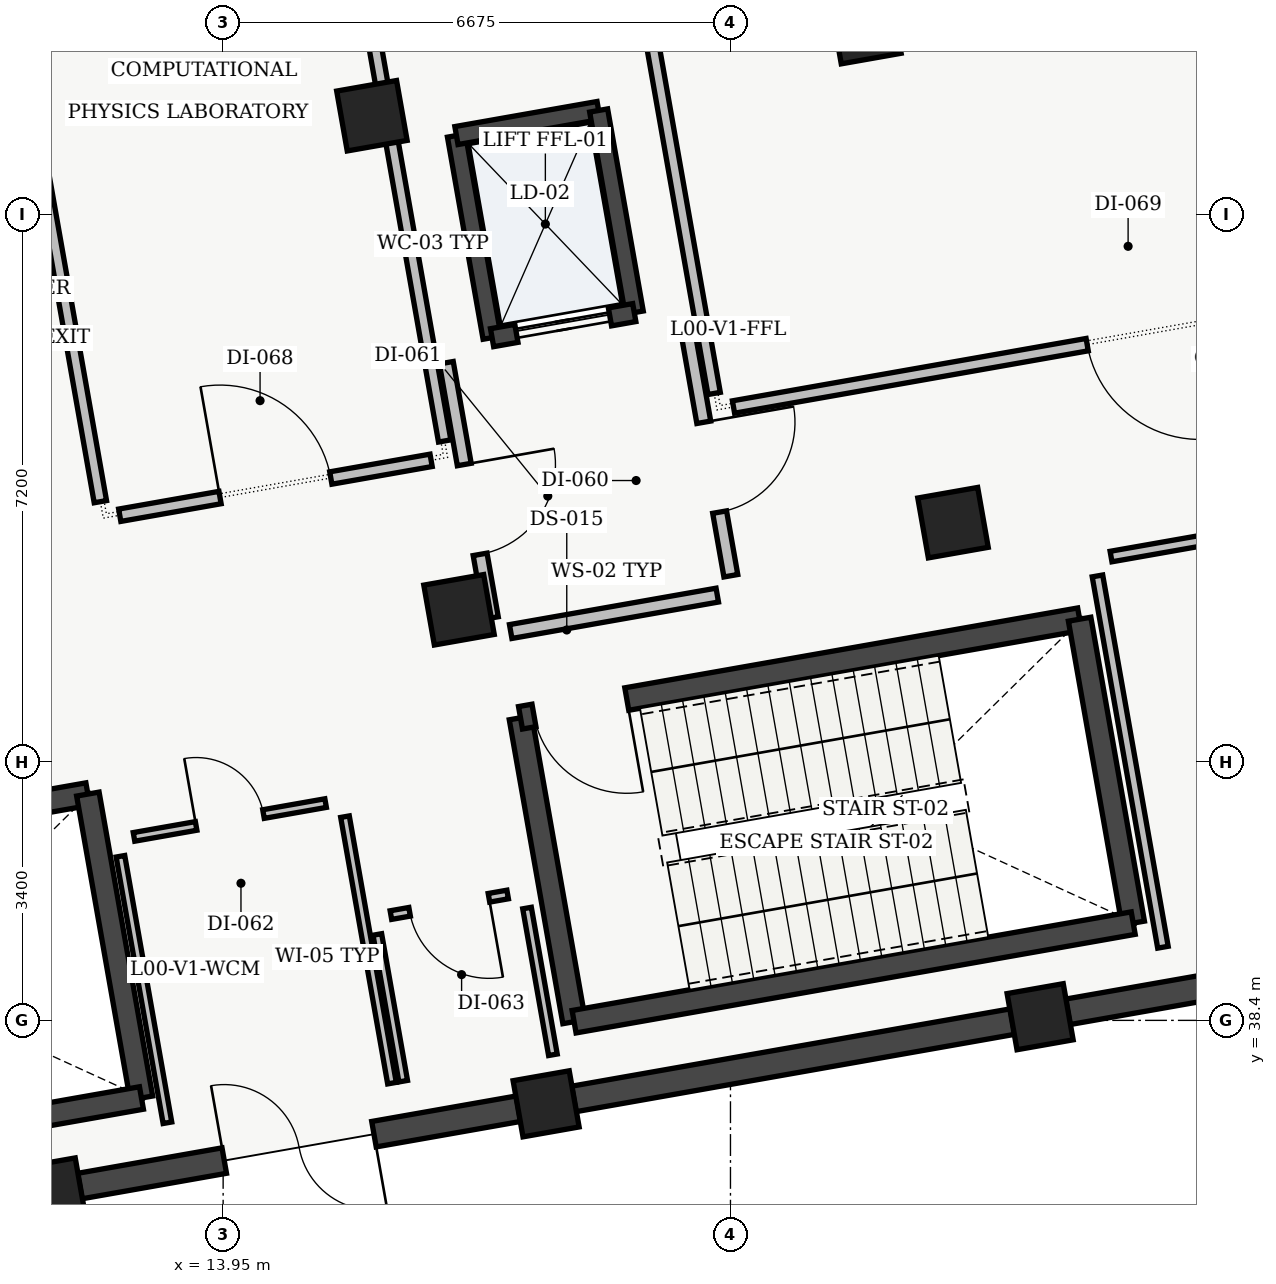
"""IFC4 building model, lengths in metres.
Left out: names, types, materials, properties, quantities, classifications, styles, units other than length and angle.
Written with IfcOpenShell. Run it as: python <this file> out.ifc"""

import sys

from ifc_helpers import new_model, si_unit, direction, frame, frame_2d, origin, origin_2d, place, context, subcontext, project, spatial, rectangle, extrude, element, fill, save


model = new_model("IFC4")
c1 = context("Model", 3, precision=1e-05, world=origin(), true_north=direction((0.0, 1.0)))
c2 = subcontext(c1, "Body", "Model", "MODEL_VIEW")
j1 = project(units=[si_unit("LENGTHUNIT", "METRE"), si_unit("PLANEANGLEUNIT", "RADIAN")], contexts=[c1])
p1 = place(None, origin())
s1 = spatial("IfcSite", under=j1, at=p1, CompositionType="ELEMENT")
p2 = place(p1, origin())
s2 = spatial("IfcBuilding", under=s1, at=p2, CompositionType="ELEMENT")
p3 = place(p2, origin())
s3 = spatial("IfcBuildingStorey", under=s2, at=p3, CompositionType="ELEMENT", Elevation=0.0)
for number, where, z_axis, x_axis in (
    (1, (11.7, 36.156, 0.0), (0.0, 0.0, 1.0), (0.985, 0.174, 0.0)),
    (2, (18.199, 37.302, 0.0), (0.0, 0.0, 1.0), (0.985, 0.174, 0.0)),
):
    element("IfcColumn", number, at=place(p3, frame(where, z_axis=z_axis, x_axis=x_axis)), inside=s3, PredefinedType="COLUMN", context=c2, shape_type="SweptSolid", body=[
        extrude(rectangle(XDim=0.75, YDim=0.75, at=origin_2d()), origin(), (0.0, 0.0, 1.0), 4.92),
    ])
for number, where, z_axis, x_axis in (
    (3, (17.053, 43.802, 0.0), (0.0, 0.0, 1.0), (0.985, 0.174, 0.0)),
    (4, (15.907, 50.302, 0.0), (0.0, 0.0, 1.0), (0.985, 0.174, 0.0)),
):
    element("IfcColumn", number, at=place(p3, frame(where, z_axis=z_axis, x_axis=x_axis)), inside=s3, PredefinedType="COLUMN", context=c2, shape_type="SweptSolid", body=[
        extrude(rectangle(XDim=0.8, YDim=0.8, at=origin_2d()), origin(), (0.0, 0.0, 1.0), 4.92),
    ])
p4 = place(p3, frame((24.699, 38.448, 0.0), z_axis=(0.0, 0.0, 1.0), x_axis=(0.984807753012, 0.173648177667, 0.0)))
e5 = element("IfcColumn", 5, at=p4, inside=s3, PredefinedType="COLUMN", context=c2, shape_type="SweptSolid", body=[
    extrude(rectangle(XDim=0.75, YDim=0.75, at=origin_2d()), origin(), (0.0, 0.0, 1.0), 4.92),
])
for number, where, z_axis, x_axis in (
    (6, (23.553, 44.948, 0.0), (0.0, 0.0, 1.0), (0.985, 0.174, 0.0)),
    (7, (22.407, 51.448, 0.0), (0.0, 0.0, 1.0), (0.985, 0.174, 0.0)),
):
    element("IfcColumn", number, at=place(p3, frame(where, z_axis=z_axis, x_axis=x_axis)), inside=s3, PredefinedType="COLUMN", context=c2, shape_type="SweptSolid", body=[
        extrude(rectangle(XDim=0.8, YDim=0.8, at=origin_2d()), origin(), (0.0, 0.0, 1.0), 4.92),
    ])
p5 = place(p3, frame((30.834, 39.53, 0.0), z_axis=(0.0, 0.0, 1.0), x_axis=(-0.984807875342, -0.1736474839, 0.0)))
e8 = element("IfcWall", 8, at=p5, inside=s3, PredefinedType="SOLIDWALL", context=c2, shape_type="SweptSolid", body=[
    extrude(rectangle(XDim=5.86, YDim=0.34, at=frame_2d((2.93, 0.0))), origin(), (0.0, 0.0, 1.0), 4.455),
])
p6 = place(p5, frame((1.955, 0.0, 0.95)))
e9 = element("IfcOpeningElement", 9, at=p6, cuts=e8, PredefinedType="OPENING", context=c2, shape_type="SweptSolid", body=[
    extrude(rectangle(XDim=1.95, YDim=1.5, at=frame_2d((0.975, 0.75))), frame((0.0, 0.17, 0.0), z_axis=(0.0, -1.0, 0.0), x_axis=(1.0, 0.0, 0.0)), (0.0, 0.0, 1.0), 0.34),
])
p7 = place(p3, frame((24.335, 38.384, 0.0), z_axis=(0.0, 0.0, 1.0), x_axis=(-0.984807875342, -0.1736474839, 0.0)))
e10 = element("IfcWall", 10, at=p7, inside=s3, PredefinedType="SOLIDWALL", context=c2, shape_type="SweptSolid", body=[
    extrude(rectangle(XDim=5.86, YDim=0.34, at=frame_2d((2.93, 0.0))), origin(), (0.0, 0.0, 1.0), 4.455),
])
p8 = place(p3, frame((17.835, 37.238, 0.0), z_axis=(0.0, 0.0, 1.0), x_axis=(-0.98480661901, -0.173654608793, 0.0)))
e11 = element("IfcWall", 11, at=p8, inside=s3, PredefinedType="SOLIDWALL", context=c2, shape_type="SweptSolid", body=[
    extrude(rectangle(XDim=5.86, YDim=0.34, at=frame_2d((2.93, 0.0))), origin(), (0.0, 0.0, 1.0), 4.455),
])
p9 = place(p8, frame((1.93, 0.0, 0.0)))
e12 = element("IfcOpeningElement", 12, at=p9, cuts=e11, PredefinedType="OPENING", context=c2, shape_type="SweptSolid", body=[
    extrude(rectangle(XDim=2.0, YDim=2.25, at=frame_2d((1.0, 1.125))), frame((0.0, 0.17, 0.0), z_axis=(0.0, -1.0, 0.0), x_axis=(1.0, 0.0, 0.0)), (0.0, 0.0, 1.0), 0.34),
])
p10 = place(p3, frame((4.814, 40.08, 0.0), z_axis=(0.0, 0.0, 1.0), x_axis=(0.984802636214, 0.173677193974, 0.0)))
e13 = element("IfcWall", 13, at=p10, inside=s3, PredefinedType="SHEAR", context=c2, shape_type="SweptSolid", body=[
    extrude(rectangle(XDim=7.47, YDim=0.3, at=frame_2d((3.735, 0.0))), origin(), (0.0, 0.0, 1.0), 4.88),
])
p11 = place(p10, frame((0.18, 0.0, 0.0)))
e14 = element("IfcOpeningElement", 14, at=p11, cuts=e13, PredefinedType="OPENING", context=c2, shape_type="SweptSolid", body=[
    extrude(rectangle(XDim=1.08, YDim=2.15, at=frame_2d((0.54, 1.075))), frame((0.0, 0.15, 0.0), z_axis=(0.0, -1.0, 0.0), x_axis=(1.0, 0.0, 0.0)), (0.0, 0.0, 1.0), 0.3),
])
p12 = place(p3, frame((12.17, 41.377, 0.0), z_axis=(0.0, 0.0, 1.0), x_axis=(0.173654983803, -0.984806552883, 0.0)))
e15 = element("IfcWall", 15, at=p12, inside=s3, PredefinedType="SHEAR", context=c2, shape_type="SweptSolid", body=[
    extrude(rectangle(XDim=4.06, YDim=0.3, at=frame_2d((2.03, 0.0))), origin(), (0.0, 0.0, 1.0), 4.88),
])
p13 = place(p3, frame((12.875, 37.379, 0.0), z_axis=(0.0, 0.0, 1.0), x_axis=(-0.984808225754, -0.173645496596, 0.0)))
e16 = element("IfcWall", 16, at=p13, inside=s3, PredefinedType="SHEAR", context=c2, shape_type="SweptSolid", body=[
    extrude(rectangle(XDim=7.47, YDim=0.3, at=frame_2d((3.735, 0.0))), origin(), (0.0, 0.0, 1.0), 4.88),
])
p14 = place(p3, frame((18.567, 38.383, 0.0), z_axis=(0.0, 0.0, 1.0), x_axis=(-0.173606946886, 0.984815022221, 0.0)))
e17 = element("IfcWall", 17, at=p14, inside=s3, PredefinedType="SHEAR", context=c2, shape_type="SweptSolid", body=[
    extrude(rectangle(XDim=4.06, YDim=0.3, at=frame_2d((2.03, 0.0))), origin(), (0.0, 0.0, 1.0), 4.88),
])
p15 = place(p3, frame((17.863, 42.381, 0.0), z_axis=(0.0, 0.0, 1.0), x_axis=(0.984808225754, 0.173645496596, 0.0)))
e18 = element("IfcWall", 18, at=p15, inside=s3, PredefinedType="SHEAR", context=c2, shape_type="SweptSolid", body=[
    extrude(rectangle(XDim=7.47, YDim=0.3, at=frame_2d((3.735, 0.0))), origin(), (0.0, 0.0, 1.0), 4.88),
])
p16 = place(p15, frame((0.18, 0.0, 0.0)))
e19 = element("IfcOpeningElement", 19, at=p16, cuts=e18, PredefinedType="OPENING", context=c2, shape_type="SweptSolid", body=[
    extrude(rectangle(XDim=1.24, YDim=2.15, at=frame_2d((0.62, 1.075))), frame((0.0, 0.15, 0.0), z_axis=(0.0, -1.0, 0.0), x_axis=(1.0, 0.0, 0.0)), (0.0, 0.0, 1.0), 0.3),
])
p17 = place(p3, frame((25.219, 43.678, 0.0), z_axis=(0.0, 0.0, 1.0), x_axis=(0.173665267602, -0.984804739443, 0.0)))
e20 = element("IfcWall", 20, at=p17, inside=s3, PredefinedType="SHEAR", context=c2, shape_type="SweptSolid", body=[
    extrude(rectangle(XDim=4.06, YDim=0.3, at=frame_2d((2.03, 0.0))), origin(), (0.0, 0.0, 1.0), 4.88),
])
p18 = place(p3, frame((25.924, 39.68, 0.0), z_axis=(0.0, 0.0, 1.0), x_axis=(-0.984809211193, -0.173639907711, 0.0)))
e21 = element("IfcWall", 21, at=p18, inside=s3, PredefinedType="SHEAR", context=c2, shape_type="SweptSolid", body=[
    extrude(rectangle(XDim=7.47, YDim=0.3, at=frame_2d((3.735, 0.0))), origin(), (0.0, 0.0, 1.0), 4.88),
])
p19 = place(p3, frame((17.488, 47.382, 0.0), z_axis=(0.0, 0.0, 1.0), x_axis=(-0.173615102578, 0.98481358447, 0.0)))
e22 = element("IfcWall", 22, at=p19, inside=s3, PredefinedType="SHEAR", context=c2, shape_type="SweptSolid", body=[
    extrude(rectangle(XDim=2.7, YDim=0.24, at=frame_2d((1.35, 0.0))), origin(), (0.0, 0.0, 1.0), 4.88),
])
p20 = place(p3, frame((17.02, 50.041, 0.0), z_axis=(0.0, 0.0, 1.0), x_axis=(0.984815882103, 0.173602068988, 0.0)))
e23 = element("IfcWall", 23, at=p20, inside=s3, PredefinedType="SHEAR", context=c2, shape_type="SweptSolid", body=[
    extrude(rectangle(XDim=1.9, YDim=0.24, at=frame_2d((0.95, 0.0))), origin(), (0.0, 0.0, 1.0), 4.88),
])
p21 = place(p3, frame((18.891, 50.371, 0.0), z_axis=(0.0, 0.0, 1.0), x_axis=(0.173615102578, -0.98481358447, 0.0)))
e24 = element("IfcWall", 24, at=p21, inside=s3, PredefinedType="SHEAR", context=c2, shape_type="SweptSolid", body=[
    extrude(rectangle(XDim=2.7, YDim=0.24, at=frame_2d((1.35, 0.0))), origin(), (0.0, 0.0, 1.0), 4.88),
])
p22 = place(p3, frame((19.359, 47.712, 0.0), z_axis=(0.0, 0.0, 1.0), x_axis=(-0.984815882103, -0.173602068988, 0.0)))
e25 = element("IfcWall", 25, at=p22, inside=s3, PredefinedType="SHEAR", context=c2, shape_type="SweptSolid", body=[
    extrude(rectangle(XDim=1.9, YDim=0.24, at=frame_2d((0.95, 0.0))), origin(), (0.0, 0.0, 1.0), 4.88),
])
p23 = place(p22, frame((0.325, 0.0, 0.0)))
e26 = element("IfcOpeningElement", 26, at=p23, cuts=e25, PredefinedType="OPENING", context=c2, shape_type="SweptSolid", body=[
    extrude(rectangle(XDim=1.25, YDim=2.2, at=frame_2d((0.625, 1.1))), frame((0.0, 0.12, 0.0), z_axis=(0.0, -1.0, 0.0), x_axis=(1.0, 0.0, 0.0)), (0.0, 0.0, 1.0), 0.24),
])
p24 = place(p3, frame((17.733, 43.516, 0.0), z_axis=(0.0, 0.0, 1.0), x_axis=(0.984808483292, 0.173644035992, 0.0)))
e27 = element("IfcWall", 27, at=p24, inside=s3, PredefinedType="SOLIDWALL", context=c2, shape_type="SweptSolid", body=[
    extrude(rectangle(XDim=2.76, YDim=0.185, at=frame_2d((1.38, 0.0))), origin(), (0.0, 0.0, 1.0), 4.55),
])
p25 = place(p3, frame((20.63, 44.25, 0.0), z_axis=(0.0, 0.0, 1.0), x_axis=(-0.173621956536, 0.984812376145, 0.0)))
e28 = element("IfcWall", 28, at=p25, inside=s3, PredefinedType="SOLIDWALL", context=c2, shape_type="SweptSolid", body=[
    extrude(rectangle(XDim=3.41, YDim=0.185, at=frame_2d((1.705, 0.0))), origin(), (0.0, 0.0, 1.0), 4.55),
])
p26 = place(p25, frame((0.85, 0.0, 0.0)))
e29 = element("IfcOpeningElement", 29, at=p26, cuts=e28, PredefinedType="OPENING", context=c2, shape_type="SweptSolid", body=[
    extrude(rectangle(XDim=1.2, YDim=2.15, at=frame_2d((0.6, 1.075))), frame((0.0, 0.093, 0.0), z_axis=(0.0, -1.0, 0.0), x_axis=(1.0, 0.0, 0.0)), (0.0, 0.0, 1.0), 0.185),
])
p27 = place(p3, frame((16.886, 47.052, 0.0), z_axis=(0.0, 0.0, 1.0), x_axis=(0.173621956536, -0.984812376145, 0.0)))
e30 = element("IfcWall", 30, at=p27, inside=s3, PredefinedType="SOLIDWALL", context=c2, shape_type="SweptSolid", body=[
    extrude(rectangle(XDim=3.41, YDim=0.185, at=frame_2d((1.705, 0.0))), origin(), (0.0, 0.0, 1.0), 4.55),
])
p28 = place(p27, frame((1.36, 0.0, 0.0)))
e31 = element("IfcOpeningElement", 31, at=p28, cuts=e30, PredefinedType="OPENING", context=c2, shape_type="SweptSolid", body=[
    extrude(rectangle(XDim=1.2, YDim=2.15, at=frame_2d((0.6, 1.075))), frame((0.0, 0.093, 0.0), z_axis=(0.0, -1.0, 0.0), x_axis=(1.0, 0.0, 0.0)), (0.0, 0.0, 1.0), 0.185),
])
p29 = place(p3, frame((16.171, 37.574, 0.0), z_axis=(0.0, 0.0, 1.0), x_axis=(-0.173644490041, 0.984808403233, 0.0)))
e32 = element("IfcWall", 32, at=p29, inside=s3, PredefinedType="PARTITIONING", context=c2, shape_type="SweptSolid", body=[
    extrude(rectangle(XDim=3.56, YDim=0.115, at=frame_2d((1.78, 0.0))), origin(), (0.0, 0.0, 1.0), 4.55),
])
p30 = place(p3, frame((15.298, 41.259, 0.0), z_axis=(0.0, 0.0, 1.0), x_axis=(-0.984803714572, -0.17367107924, 0.0)))
e33 = element("IfcWall", 33, at=p30, inside=s3, PredefinedType="PARTITIONING", context=c2, shape_type="SweptSolid", body=[
    extrude(rectangle(XDim=2.56, YDim=0.115, at=frame_2d((1.28, 0.0))), origin(), (0.0, 0.0, 1.0), 4.55),
])
p31 = place(p30, frame((0.83, 0.0, 0.0)))
e34 = element("IfcOpeningElement", 34, at=p31, cuts=e33, PredefinedType="OPENING", context=c2, shape_type="SweptSolid", body=[
    extrude(rectangle(XDim=0.9, YDim=2.1, at=frame_2d((0.45, 1.05))), frame((0.0, 0.058, 0.0), z_axis=(0.0, -1.0, 0.0), x_axis=(1.0, 0.0, 0.0)), (0.0, 0.0, 1.0), 0.115),
])
p32 = place(p3, frame((12.599, 40.559, 0.0), z_axis=(0.0, 0.0, 1.0), x_axis=(0.173644490041, -0.984808403233, 0.0)))
e35 = element("IfcWall", 35, at=p32, inside=s3, PredefinedType="PARTITIONING", context=c2, shape_type="SweptSolid", body=[
    extrude(rectangle(XDim=3.56, YDim=0.115, at=frame_2d((1.78, 0.0))), origin(), (0.0, 0.0, 1.0), 4.55),
])
p33 = place(p3, frame((18.289, 37.948, 0.0), z_axis=(0.0, 0.0, 1.0), x_axis=(-0.173643211285, 0.984808628706, 0.0)))
e36 = element("IfcWall", 36, at=p33, inside=s3, PredefinedType="PARTITIONING", context=c2, shape_type="SweptSolid", body=[
    extrude(rectangle(XDim=1.96, YDim=0.115, at=frame_2d((0.98, 0.0))), origin(), (0.0, 0.0, 1.0), 4.255),
])
p34 = place(p3, frame((17.694, 40.056, 0.0), z_axis=(0.0, 0.0, 1.0), x_axis=(-0.984797734253, -0.173704987291, 0.0)))
e37 = element("IfcWall", 37, at=p34, inside=s3, PredefinedType="PARTITIONING", context=c2, shape_type="SweptSolid", body=[
    extrude(rectangle(XDim=1.56, YDim=0.115, at=frame_2d((0.78, 0.0))), origin(), (0.0, 0.0, 1.0), 4.55),
])
p35 = place(p34, frame((0.25, 0.0, 0.0)))
e38 = element("IfcOpeningElement", 38, at=p35, cuts=e37, PredefinedType="OPENING", context=c2, shape_type="SweptSolid", body=[
    extrude(rectangle(XDim=1.06, YDim=2.12, at=frame_2d((0.53, 1.06))), frame((0.0, 0.058, 0.0), z_axis=(0.0, -1.0, 0.0), x_axis=(1.0, 0.0, 0.0)), (0.0, 0.0, 1.0), 0.115),
])
p36 = place(p3, frame((15.979, 39.53, 0.0), z_axis=(0.0, 0.0, 1.0), x_axis=(0.173643211285, -0.984808628706, 0.0)))
e39 = element("IfcWall", 39, at=p36, inside=s3, PredefinedType="PARTITIONING", context=c2, shape_type="SweptSolid", body=[
    extrude(rectangle(XDim=1.96, YDim=0.115, at=frame_2d((0.98, 0.0))), origin(), (0.0, 0.0, 1.0), 4.55),
])
p37 = place(p3, frame((29.778, 45.233, 0.0), z_axis=(0.0, 0.0, 1.0), x_axis=(-0.984811568751, -0.173626536147, 0.0)))
e40 = element("IfcWall", 40, at=p37, inside=s3, PredefinedType="PARTITIONING", context=c2, shape_type="SweptSolid", body=[
    extrude(rectangle(XDim=4.21, YDim=0.14, at=frame_2d((2.105, 0.0))), origin(), (0.0, 0.0, 1.0), 4.55),
])
p38 = place(p37, frame((1.635, 0.0, 0.0)))
e41 = element("IfcOpeningElement", 41, at=p38, cuts=e40, PredefinedType="OPENING", context=c2, shape_type="SweptSolid", body=[
    extrude(rectangle(XDim=0.94, YDim=2.12, at=frame_2d((0.47, 1.06))), frame((0.0, 0.07, 0.0), z_axis=(0.0, -1.0, 0.0), x_axis=(1.0, 0.0, 0.0)), (0.0, 0.0, 1.0), 0.14),
])
p39 = place(p3, frame((25.454, 44.247, 0.0), z_axis=(0.0, 0.0, 1.0), x_axis=(0.173658971256, -0.98480584975, 0.0)))
e42 = element("IfcWall", 42, at=p39, inside=s3, PredefinedType="PARTITIONING", context=c2, shape_type="SweptSolid", body=[
    extrude(rectangle(XDim=4.96, YDim=0.14, at=frame_2d((2.48, 0.0))), origin(), (0.0, 0.0, 1.0), 4.55),
])
p40 = place(p3, frame((12.59, 45.046, 0.0), z_axis=(0.0, 0.0, 1.0), x_axis=(0.984805411783, 0.173661454915, 0.0)))
e43 = element("IfcWall", 43, at=p40, inside=s3, PredefinedType="PARTITIONING", context=c2, shape_type="SweptSolid", body=[
    extrude(rectangle(XDim=4.16, YDim=0.165, at=frame_2d((2.08, 0.0))), origin(), (0.0, 0.0, 1.0), 4.505),
])
p41 = place(p40, frame((1.34, 0.0, 0.0)))
e44 = element("IfcOpeningElement", 44, at=p41, cuts=e43, PredefinedType="OPENING", context=c2, shape_type="SweptSolid", body=[
    extrude(rectangle(XDim=1.48, YDim=2.1, at=frame_2d((0.74, 1.05))), frame((0.0, 0.083, 0.0), z_axis=(0.0, -1.0, 0.0), x_axis=(1.0, 0.0, 0.0)), (0.0, 0.0, 1.0), 0.165),
])
p42 = place(p3, frame((16.865, 46.023, 0.0), z_axis=(0.0, 0.0, 1.0), x_axis=(-0.173632075677, 0.984810592092, 0.0)))
e45 = element("IfcWall", 45, at=p42, inside=s3, PredefinedType="PARTITIONING", context=c2, shape_type="SweptSolid", body=[
    extrude(rectangle(XDim=10.36, YDim=0.165, at=frame_2d((5.18, 0.0))), origin(), (0.0, 0.0, 1.0), 4.255),
])
p43 = place(p3, frame((10.536, 55.427, 0.0), z_axis=(0.0, 0.0, 1.0), x_axis=(0.173654930775, -0.984806562233, 0.0)))
e46 = element("IfcWall", 46, at=p43, inside=s3, PredefinedType="PARTITIONING", context=c2, shape_type="SweptSolid", body=[
    extrude(rectangle(XDim=10.36, YDim=0.165, at=frame_2d((5.18, 0.0))), origin(), (0.0, 0.0, 1.0), 4.55),
])
p44 = place(p3, frame((20.665, 46.469, 0.0), z_axis=(0.0, 0.0, 1.0), x_axis=(0.98480552757, 0.173660798302, 0.0)))
e47 = element("IfcWall", 47, at=p44, inside=s3, PredefinedType="PARTITIONING", context=c2, shape_type="SweptSolid", body=[
    extrude(rectangle(XDim=10.96, YDim=0.165, at=frame_2d((5.48, 0.0))), origin(), (0.0, 0.0, 1.0), 4.505),
])
p45 = place(p44, frame((4.725, 0.0, 0.0)))
e48 = element("IfcOpeningElement", 48, at=p45, cuts=e47, PredefinedType="OPENING", context=c2, shape_type="SweptSolid", body=[
    extrude(rectangle(XDim=1.51, YDim=2.12, at=frame_2d((0.755, 1.06))), frame((0.0, 0.083, 0.0), z_axis=(0.0, -1.0, 0.0), x_axis=(1.0, 0.0, 0.0)), (0.0, 0.0, 1.0), 0.165),
])
p46 = place(p3, frame((18.611, 56.851, 0.0), z_axis=(0.0, 0.0, 1.0), x_axis=(0.173654930775, -0.984806562233, 0.0)))
e49 = element("IfcWall", 49, at=p46, inside=s3, PredefinedType="PARTITIONING", context=c2, shape_type="SweptSolid", body=[
    extrude(rectangle(XDim=10.36, YDim=0.165, at=frame_2d((5.18, 0.0))), origin(), (0.0, 0.0, 1.0), 4.55),
])
p47 = place(p9, origin())
e50 = element("IfcDoor", 50, at=p47, inside=s3, OperationType="DOUBLE_DOOR_SINGLE_SWING", PredefinedType="DOOR", context=c2, shape_type="SweptSolid", body=[
    extrude(rectangle(XDim=2.0, YDim=2.25, at=frame_2d((1.0, 1.125))), frame((0.0, 0.025, 0.0), z_axis=(0.0, -1.0, 0.0), x_axis=(1.0, 0.0, 0.0)), (0.0, 0.0, 1.0), 0.05),
])
fill(e12, e50)
p48 = place(p16, origin())
e51 = element("IfcDoor", 51, at=p48, inside=s3, OperationType="SINGLE_SWING_RIGHT", PredefinedType="DOOR", context=c2, shape_type="SweptSolid", body=[
    extrude(rectangle(XDim=1.24, YDim=2.15, at=frame_2d((0.62, 1.075))), frame((0.0, 0.025, 0.0), z_axis=(0.0, -1.0, 0.0), x_axis=(1.0, 0.0, 0.0)), (0.0, 0.0, 1.0), 0.05),
])
fill(e19, e51)
p49 = place(p23, origin())
e52 = element("IfcDoor", 52, at=p49, inside=s3, OperationType="SLIDING_TO_RIGHT", PredefinedType="DOOR", context=c2, shape_type="SweptSolid", body=[
    extrude(rectangle(XDim=1.25, YDim=2.2, at=frame_2d((0.625, 1.1))), frame((0.0, 0.025, 0.0), z_axis=(0.0, -1.0, 0.0), x_axis=(1.0, 0.0, 0.0)), (0.0, 0.0, 1.0), 0.05),
])
fill(e26, e52)
p50 = place(p26, origin())
e53 = element("IfcDoor", 53, at=p50, inside=s3, OperationType="SINGLE_SWING_RIGHT", PredefinedType="DOOR", context=c2, shape_type="SweptSolid", body=[
    extrude(rectangle(XDim=1.2, YDim=2.15, at=frame_2d((0.6, 1.075))), frame((0.0, 0.025, 0.0), z_axis=(0.0, -1.0, 0.0), x_axis=(1.0, 0.0, 0.0)), (0.0, 0.0, 1.0), 0.05),
])
fill(e29, e53)
p51 = place(p28, origin())
e54 = element("IfcDoor", 54, at=p51, inside=s3, OperationType="SINGLE_SWING_LEFT", PredefinedType="DOOR", context=c2, shape_type="SweptSolid", body=[
    extrude(rectangle(XDim=1.2, YDim=2.15, at=frame_2d((0.6, 1.075))), frame((0.0, 0.025, 0.0), z_axis=(0.0, -1.0, 0.0), x_axis=(1.0, 0.0, 0.0)), (0.0, 0.0, 1.0), 0.05),
])
fill(e31, e54)
p52 = place(p31, origin())
e55 = element("IfcDoor", 55, at=p52, inside=s3, OperationType="SINGLE_SWING_RIGHT", PredefinedType="DOOR", context=c2, shape_type="SweptSolid", body=[
    extrude(rectangle(XDim=0.9, YDim=2.1, at=frame_2d((0.45, 1.05))), frame((0.0, 0.025, 0.0), z_axis=(0.0, -1.0, 0.0), x_axis=(1.0, 0.0, 0.0)), (0.0, 0.0, 1.0), 0.05),
])
fill(e34, e55)
p53 = place(p35, origin())
e56 = element("IfcDoor", 56, at=p53, inside=s3, OperationType="SINGLE_SWING_LEFT", PredefinedType="DOOR", context=c2, shape_type="SweptSolid", body=[
    extrude(rectangle(XDim=1.06, YDim=2.12, at=frame_2d((0.53, 1.06))), frame((0.0, 0.025, 0.0), z_axis=(0.0, -1.0, 0.0), x_axis=(1.0, 0.0, 0.0)), (0.0, 0.0, 1.0), 0.05),
])
fill(e38, e56)
p54 = place(p41, origin())
e57 = element("IfcDoor", 57, at=p54, inside=s3, OperationType="SINGLE_SWING_LEFT", PredefinedType="DOOR", context=c2, shape_type="SweptSolid", body=[
    extrude(rectangle(XDim=1.48, YDim=2.1, at=frame_2d((0.74, 1.05))), frame((0.0, 0.025, 0.0), z_axis=(0.0, -1.0, 0.0), x_axis=(1.0, 0.0, 0.0)), (0.0, 0.0, 1.0), 0.05),
])
fill(e44, e57)
p55 = place(p45, origin())
e58 = element("IfcDoor", 58, at=p55, inside=s3, OperationType="SINGLE_SWING_RIGHT", PredefinedType="DOOR", context=c2, shape_type="SweptSolid", body=[
    extrude(rectangle(XDim=1.51, YDim=2.12, at=frame_2d((0.755, 1.06))), frame((0.0, 0.025, 0.0), z_axis=(0.0, -1.0, 0.0), x_axis=(1.0, 0.0, 0.0)), (0.0, 0.0, 1.0), 0.05),
])
fill(e48, e58)
save(model, sys.argv[1])
